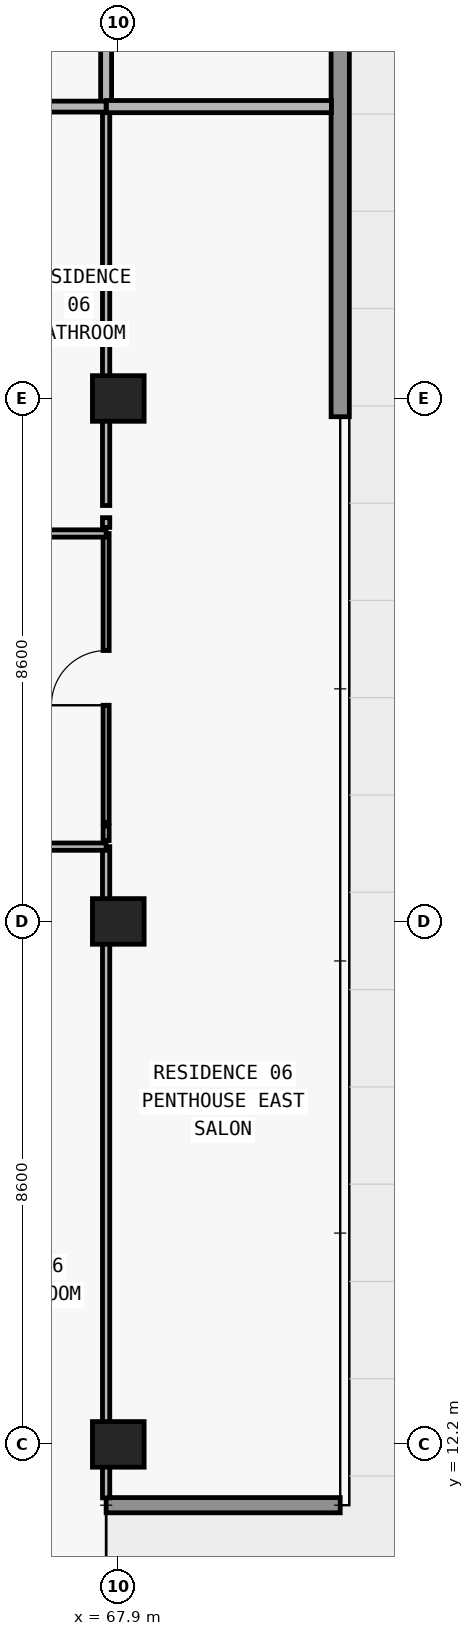
"""IFC4 building model, lengths in metres.
Left out: names, types, materials, properties, quantities, classifications, styles, units other than length and angle.
Written with IfcOpenShell. Run it as: python <this file> out.ifc"""

import sys

from ifc_helpers import new_model, si_unit, direction, frame, frame_2d, origin, origin_2d, place, context, subcontext, project, spatial, rectangle, extrude, element, fill, save


model = new_model("IFC4")
c1 = context("Model", 3, precision=1e-05, world=origin(), true_north=direction((0.0, 1.0)))
c2 = subcontext(c1, "Body", "Model", "MODEL_VIEW")
j1 = project(units=[si_unit("LENGTHUNIT", "METRE"), si_unit("PLANEANGLEUNIT", "RADIAN")], contexts=[c1])
p1 = place(None, origin())
s1 = spatial("IfcSite", under=j1, at=p1, CompositionType="ELEMENT")
p2 = place(p1, origin())
s2 = spatial("IfcBuilding", under=s1, at=p2, CompositionType="ELEMENT")
p3 = place(p2, frame((0.0, 0.0, 157.2)))
s3 = spatial("IfcBuildingStorey", under=s2, at=p3, CompositionType="ELEMENT", Elevation=157.2)
for number, where, z_axis, x_axis in (
    (1, (67.9, 12.2, 0.0), (0.0, 0.0, 1.0), (1.0, 0.0, 0.0)),
    (2, (67.9, 20.8, 0.0), (0.0, 0.0, 1.0), (1.0, 0.0, 0.0)),
    (3, (67.9, 29.4, 0.0), (0.0, 0.0, 1.0), (1.0, 0.0, 0.0)),
):
    element("IfcColumn", number, at=place(p3, frame(where, z_axis=z_axis, x_axis=x_axis)), inside=s3, PredefinedType="COLUMN", context=c2, shape_type="SweptSolid", body=[
        extrude(rectangle(XDim=0.85, YDim=0.75, at=origin_2d()), origin(), (0.0, 0.0, 1.0), 3.05),
    ])
p4 = place(p3, frame((67.7, 11.2, 0.0), z_axis=(0.0, 0.0, 1.0), x_axis=(1.0, 0.0, 0.0)))
e4 = element("IfcWall", 4, at=p4, inside=s3, PredefinedType="ELEMENTEDWALL", context=c2, shape_type="SweptSolid", body=[
    extrude(rectangle(XDim=3.85, YDim=0.25, at=frame_2d((1.925, 0.0))), origin(), (0.0, 0.0, 1.0), 3.05),
])
p5 = place(p3, frame((71.55, 47.0, 0.0), z_axis=(0.0, 0.0, 1.0), x_axis=(0.0, -1.0, 0.0)))
e5 = element("IfcWall", 5, at=p5, inside=s3, PredefinedType="STANDARD", context=c2, shape_type="SweptSolid", body=[
    extrude(rectangle(XDim=17.9, YDim=0.3, at=frame_2d((8.95, 0.0))), origin(), (0.0, 0.0, 1.0), 3.05),
])
p6 = place(p3, frame((67.7, 11.32, 0.0), z_axis=(0.0, 0.0, 1.0), x_axis=(0.0, 1.0, 0.0)))
e6 = element("IfcWall", 6, at=p6, inside=s3, PredefinedType="PARTITIONING", context=c2, shape_type="SweptSolid", body=[
    extrude(rectangle(XDim=10.71, YDim=0.12, at=frame_2d((5.355, 0.0))), origin(), (0.0, 0.0, 1.0), 2.263),
])
p7 = place(p3, frame((67.7, 22.13, 0.0), z_axis=(0.0, 0.0, 1.0), x_axis=(0.0, 1.0, 0.0)))
e7 = element("IfcWall", 7, at=p7, inside=s3, PredefinedType="MOVABLE", context=c2, shape_type="SweptSolid", body=[
    extrude(rectangle(XDim=0.24, YDim=0.1, at=frame_2d((0.12, 0.0))), origin(), (0.0, 0.0, 1.0), 2.263),
])
p8 = place(p3, frame((67.7, 22.43, 0.0), z_axis=(0.0, 0.0, 1.0), x_axis=(0.0, 1.0, 0.0)))
e8 = element("IfcWall", 8, at=p8, inside=s3, PredefinedType="MOVABLE", context=c2, shape_type="SweptSolid", body=[
    extrude(rectangle(XDim=4.75, YDim=0.1, at=frame_2d((2.375, 0.0))), origin(), (0.0, 0.0, 1.0), 2.263),
])
p9 = place(p8, frame((1.925, 0.0, 0.0)))
e9 = element("IfcOpeningElement", 9, at=p9, cuts=e8, PredefinedType="OPENING", context=c2, shape_type="SweptSolid", body=[
    extrude(rectangle(XDim=0.9, YDim=2.15, at=frame_2d((0.45, 1.075))), frame((0.0, 0.06, 0.0), z_axis=(0.0, -1.0, 0.0), x_axis=(1.0, 0.0, 0.0)), (0.0, 0.0, 1.0), 0.12),
])
p10 = place(p3, frame((67.7, 27.28, 0.0), z_axis=(0.0, 0.0, 1.0), x_axis=(0.0, 1.0, 0.0)))
e10 = element("IfcWall", 10, at=p10, inside=s3, PredefinedType="PARTITIONING", context=c2, shape_type="SweptSolid", body=[
    extrude(rectangle(XDim=0.16, YDim=0.12, at=frame_2d((0.08, 0.0))), origin(), (0.0, 0.0, 1.0), 2.263),
])
p11 = place(p3, frame((67.7, 27.64, 0.0), z_axis=(0.0, 0.0, 1.0), x_axis=(0.0, 1.0, 0.0)))
e11 = element("IfcWall", 11, at=p11, inside=s3, PredefinedType="PARTITIONING", context=c2, shape_type="SweptSolid", body=[
    extrude(rectangle(XDim=6.56, YDim=0.12, at=frame_2d((3.28, 0.0))), origin(), (0.0, 0.0, 1.0), 2.263),
])
p12 = place(p3, frame((67.7, 34.205, 0.0), z_axis=(0.0, 0.0, 1.0), x_axis=(0.0, 1.0, 0.0)))
e12 = element("IfcWall", 12, at=p12, inside=s3, PredefinedType="PARTITIONING", context=c2, shape_type="SweptSolid", body=[
    extrude(rectangle(XDim=2.745, YDim=0.18, at=frame_2d((1.373, 0.0))), origin(), (0.0, 0.0, 1.0), 2.263),
])
p13 = place(p3, frame((59.55, 22.03, 0.0), z_axis=(0.0, 0.0, 1.0), x_axis=(1.0, 0.0, 0.0)))
e13 = element("IfcWall", 13, at=p13, inside=s3, PredefinedType="PARTITIONING", context=c2, shape_type="SweptSolid", body=[
    extrude(rectangle(XDim=8.15, YDim=0.12, at=frame_2d((4.075, 0.0))), origin(), (0.0, 0.0, 1.0), 3.05),
])
p14 = place(p13, frame((1.614, 0.0, 0.0)))
e14 = element("IfcOpeningElement", 14, at=p14, cuts=e13, PredefinedType="OPENING", context=c2, shape_type="SweptSolid", body=[
    extrude(rectangle(XDim=0.9, YDim=2.15, at=frame_2d((0.45, 1.075))), frame((0.0, 0.07, 0.0), z_axis=(0.0, -1.0, 0.0), x_axis=(1.0, 0.0, 0.0)), (0.0, 0.0, 1.0), 0.14),
])
p15 = place(p13, frame((5.855, 0.0, 0.0)))
e15 = element("IfcOpeningElement", 15, at=p15, cuts=e13, PredefinedType="OPENING", context=c2, shape_type="SweptSolid", body=[
    extrude(rectangle(XDim=0.9, YDim=2.15, at=frame_2d((0.45, 1.075))), frame((0.0, 0.07, 0.0), z_axis=(0.0, -1.0, 0.0), x_axis=(1.0, 0.0, 0.0)), (0.0, 0.0, 1.0), 0.14),
])
p16 = place(p3, frame((59.55, 27.18, 0.0), z_axis=(0.0, 0.0, 1.0), x_axis=(1.0, 0.0, 0.0)))
e16 = element("IfcWall", 16, at=p16, inside=s3, PredefinedType="PARTITIONING", context=c2, shape_type="SweptSolid", body=[
    extrude(rectangle(XDim=8.15, YDim=0.12, at=frame_2d((4.075, 0.0))), origin(), (0.0, 0.0, 1.0), 3.05),
])
p17 = place(p16, frame((1.614, 0.0, 0.0)))
e17 = element("IfcOpeningElement", 17, at=p17, cuts=e16, PredefinedType="OPENING", context=c2, shape_type="SweptSolid", body=[
    extrude(rectangle(XDim=0.9, YDim=2.15, at=frame_2d((0.45, 1.075))), frame((0.0, 0.07, 0.0), z_axis=(0.0, -1.0, 0.0), x_axis=(1.0, 0.0, 0.0)), (0.0, 0.0, 1.0), 0.14),
])
p18 = place(p3, frame((59.55, 34.2, 0.0), z_axis=(0.0, 0.0, 1.0), x_axis=(1.0, 0.0, 0.0)))
e18 = element("IfcWall", 18, at=p18, inside=s3, PredefinedType="PARTITIONING", context=c2, shape_type="SweptSolid", body=[
    extrude(rectangle(XDim=8.15, YDim=0.18, at=frame_2d((4.075, 0.0))), origin(), (0.0, 0.0, 1.0), 3.05),
])
p19 = place(p18, frame((2.75, 0.0, 0.0)))
e19 = element("IfcOpeningElement", 19, at=p19, cuts=e18, PredefinedType="OPENING", context=c2, shape_type="SweptSolid", body=[
    extrude(rectangle(XDim=1.0, YDim=2.2, at=frame_2d((0.5, 1.1))), frame((0.0, 0.1, 0.0), z_axis=(0.0, -1.0, 0.0), x_axis=(1.0, 0.0, 0.0)), (0.0, 0.0, 1.0), 0.2),
])
p20 = place(p3, frame((67.705, 34.2, 0.0), z_axis=(0.0, 0.0, 1.0), x_axis=(1.0, 0.0, 0.0)))
e20 = element("IfcWall", 20, at=p20, inside=s3, PredefinedType="PARTITIONING", context=c2, shape_type="SweptSolid", body=[
    extrude(rectangle(XDim=3.7, YDim=0.2, at=frame_2d((1.85, 0.0))), origin(), (0.0, 0.0, 1.0), 3.05),
])
p21 = place(p9, origin())
e21 = element("IfcDoor", 21, at=p21, inside=s3, OperationType="SINGLE_SWING_LEFT", PredefinedType="DOOR", context=c2, shape_type="SweptSolid", body=[
    extrude(rectangle(XDim=0.9, YDim=2.15, at=frame_2d((0.45, 1.075))), frame((0.0, 0.025, 0.0), z_axis=(0.0, -1.0, 0.0), x_axis=(1.0, 0.0, 0.0)), (0.0, 0.0, 1.0), 0.05),
])
fill(e9, e21)
save(model, sys.argv[1])
